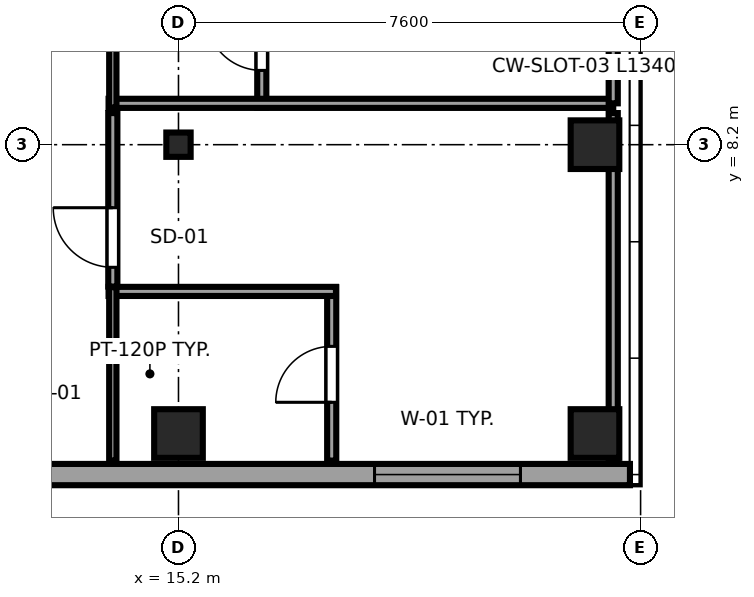
"""IFC4 building model, lengths in metres.
Left out: names, types, materials, properties, quantities, classifications, styles, units other than length and angle.
Written with IfcOpenShell. Run it as: python <this file> out.ifc"""

import sys

from ifc_helpers import new_model, si_unit, direction, frame, frame_2d, origin, origin_2d, place, context, subcontext, project, spatial, rectangle, i_section, extrude, source, transform, mapped, element, fill, save


model = new_model("IFC4")
c1 = context("Model", 3, precision=1e-05, world=origin(), true_north=direction((0.0, 1.0)))
c2 = subcontext(c1, "Body", "Model", "MODEL_VIEW")
j1 = project(units=[si_unit("LENGTHUNIT", "METRE"), si_unit("PLANEANGLEUNIT", "RADIAN")], contexts=[c1])
p1 = place(None, origin())
s1 = spatial("IfcSite", under=j1, at=p1, CompositionType="ELEMENT")
p2 = place(p1, origin())
s2 = spatial("IfcBuilding", under=s1, at=p2, CompositionType="ELEMENT")
p3 = place(p2, frame((0.0, 0.0, 187.55)))
s3 = spatial("IfcBuildingStorey", under=s2, at=p3, CompositionType="ELEMENT", Elevation=187.55)
m1 = source(origin(), c2, "Body", "SweptSolid", [
    extrude(rectangle(XDim=0.8, YDim=0.8, at=origin_2d()), origin(), (0.0, 0.0, 1.0), 3.55),
])
p4 = place(p3, frame((15.2, 3.45, 0.0), z_axis=(0.0, 0.0, 1.0), x_axis=(1.0, 0.0, 0.0)))
e1 = element("IfcColumn", 1, at=p4, inside=s3, PredefinedType="COLUMN", context=c2, shape_type="MappedRepresentation", body=[
    mapped(m1, transform((0.0, 0.0, 0.0), x_axis=(1.0, 0.0, 0.0), y_axis=(0.0, 1.0, 0.0), z_axis=(0.0, 0.0, 1.0), scale=1.0)),
])
m2 = source(origin(), c2, "Body", "SweptSolid", [
    extrude(i_section(OverallWidth=0.4, OverallDepth=0.4, WebThickness=0.02, FlangeThickness=0.035, at=origin_2d()), origin(), (0.0, 0.0, 1.0), 3.55),
])
p5 = place(p3, frame((15.2, 8.2, 0.0), z_axis=(0.0, 0.0, 1.0), x_axis=(1.0, 0.0, 0.0)))
e2 = element("IfcColumn", 2, at=p5, inside=s3, PredefinedType="COLUMN", context=c2, shape_type="MappedRepresentation", body=[
    mapped(m2, transform((0.0, 0.0, 0.0), x_axis=(1.0, 0.0, 0.0), y_axis=(0.0, 1.0, 0.0), z_axis=(0.0, 0.0, 1.0), scale=1.0)),
])
for number, where, z_axis, x_axis in (
    (3, (22.05, 3.45, 0.0), (0.0, 0.0, 1.0), (1.0, 0.0, 0.0)),
    (4, (22.05, 8.2, 0.0), (0.0, 0.0, 1.0), (1.0, 0.0, 0.0)),
):
    element("IfcColumn", number, at=place(p3, frame(where, z_axis=z_axis, x_axis=x_axis)), inside=s3, PredefinedType="COLUMN", context=c2, shape_type="MappedRepresentation", body=[
        mapped(m1, transform((0.0, 0.0, 0.0), x_axis=(1.0, 0.0, 0.0), y_axis=(0.0, 1.0, 0.0), z_axis=(0.0, 0.0, 1.0), scale=1.0)),
    ])
p6 = place(p3, frame((7.017, 2.775, 0.0), z_axis=(0.0, 0.0, 1.0), x_axis=(1.0, 0.0, 0.0)))
e5 = element("IfcWall", 5, at=p6, inside=s3, PredefinedType="SOLIDWALL", context=c2, shape_type="SweptSolid", body=[
    extrude(rectangle(XDim=15.608, YDim=0.35, at=frame_2d((7.804, 0.0))), origin(), (0.0, 0.0, 1.0), 3.37),
])
p7 = place(p6, frame((1.801, 0.0, 0.68)))
e6 = element("IfcOpeningElement", 6, at=p7, cuts=e5, PredefinedType="OPENING", context=c2, shape_type="SweptSolid", body=[
    extrude(rectangle(XDim=2.4, YDim=1.9, at=frame_2d((1.2, 0.95))), frame((0.0, 0.185, 0.0), z_axis=(0.0, -1.0, 0.0), x_axis=(1.0, 0.0, 0.0)), (0.0, 0.0, 1.0), 0.37),
])
p8 = place(p6, frame((11.407, 0.0, 0.68)))
e7 = element("IfcOpeningElement", 7, at=p8, cuts=e5, PredefinedType="OPENING", context=c2, shape_type="SweptSolid", body=[
    extrude(rectangle(XDim=2.4, YDim=1.9, at=frame_2d((1.2, 0.95))), frame((0.0, 0.185, 0.0), z_axis=(0.0, -1.0, 0.0), x_axis=(1.0, 0.0, 0.0)), (0.0, 0.0, 1.0), 0.37),
])
p9 = place(p3, frame((17.72, 3.005, 0.0), z_axis=(0.0, 0.0, 1.0), x_axis=(0.0, 1.0, 0.0)))
e8 = element("IfcWall", 8, at=p9, inside=s3, PredefinedType="PARTITIONING", context=c2, shape_type="SweptSolid", body=[
    extrude(rectangle(XDim=2.852, YDim=0.15, at=frame_2d((1.426, 0.0))), origin(), (0.0, 0.0, 1.0), 3.37),
])
p10 = place(p9, frame((0.958, 0.0, 0.0)))
e9 = element("IfcOpeningElement", 9, at=p10, cuts=e8, PredefinedType="OPENING", context=c2, shape_type="SweptSolid", body=[
    extrude(rectangle(XDim=0.92, YDim=2.01, at=frame_2d((0.46, 1.005))), frame((0.0, 0.085, 0.0), z_axis=(0.0, -1.0, 0.0), x_axis=(1.0, 0.0, 0.0)), (0.0, 0.0, 1.0), 0.17),
])
p11 = place(p3, frame((14.05, 5.787, 0.0), z_axis=(0.0, 0.0, 1.0), x_axis=(1.0, 0.0, 0.0)))
e10 = element("IfcWall", 10, at=p11, inside=s3, PredefinedType="PARTITIONING", context=c2, shape_type="SweptSolid", body=[
    extrude(rectangle(XDim=3.74, YDim=0.15, at=frame_2d((1.87, 0.0))), origin(), (0.0, 0.0, 1.0), 3.37),
])
p12 = place(p3, frame((14.12, 3.005, 0.0), z_axis=(0.0, 0.0, 1.0), x_axis=(0.0, 1.0, 0.0)))
e11 = element("IfcWall", 11, at=p12, inside=s3, PredefinedType="PLUMBINGWALL", context=c2, shape_type="SweptSolid", body=[
    extrude(rectangle(XDim=2.852, YDim=0.12, at=frame_2d((1.426, 0.0))), origin(), (0.0, 0.0, 1.0), 3.37),
])
p13 = place(p3, frame((16.57, 8.81, 0.0), z_axis=(0.0, 0.0, 1.0), x_axis=(0.0, 1.0, 0.0)))
e12 = element("IfcWall", 12, at=p13, inside=s3, PredefinedType="PARTITIONING", context=c2, shape_type="SweptSolid", body=[
    extrude(rectangle(XDim=2.283, YDim=0.15, at=frame_2d((1.142, 0.0))), origin(), (0.0, 0.0, 1.0), 3.37),
])
p14 = place(p13, frame((0.612, 0.0, 0.0)))
e13 = element("IfcOpeningElement", 13, at=p14, cuts=e12, PredefinedType="OPENING", context=c2, shape_type="SweptSolid", body=[
    extrude(rectangle(XDim=0.92, YDim=2.01, at=frame_2d((0.46, 1.005))), frame((0.0, 0.085, 0.0), z_axis=(0.0, -1.0, 0.0), x_axis=(1.0, 0.0, 0.0)), (0.0, 0.0, 1.0), 0.17),
])
p15 = place(p3, frame((14.05, 8.88, 0.0), z_axis=(0.0, 0.0, 1.0), x_axis=(1.0, 0.0, 0.0)))
e14 = element("IfcWall", 14, at=p15, inside=s3, PredefinedType="PARTITIONING", context=c2, shape_type="SweptSolid", body=[
    extrude(rectangle(XDim=8.3, YDim=0.15, at=frame_2d((4.15, 0.0))), origin(), (0.0, 0.0, 1.0), 3.37),
])
p16 = place(p3, frame((14.12, 8.81, 0.0), z_axis=(0.0, 0.0, 1.0), x_axis=(0.0, 1.0, 0.0)))
e15 = element("IfcWall", 15, at=p16, inside=s3, PredefinedType="PLUMBINGWALL", context=c2, shape_type="SweptSolid", body=[
    extrude(rectangle(XDim=2.283, YDim=0.12, at=frame_2d((1.142, 0.0))), origin(), (0.0, 0.0, 1.0), 3.37),
])
p17 = place(p3, frame((14.12, 5.867, 0.0), z_axis=(0.0, 0.0, 1.0), x_axis=(0.0, 1.0, 0.0)))
e16 = element("IfcWall", 16, at=p17, inside=s3, PredefinedType="PARTITIONING", context=c2, shape_type="SweptSolid", body=[
    extrude(rectangle(XDim=2.853, YDim=0.15, at=frame_2d((1.427, 0.0))), origin(), (0.0, 0.0, 1.0), 3.37),
])
p18 = place(p17, frame((0.316, 0.0, 0.0)))
e17 = element("IfcOpeningElement", 17, at=p18, cuts=e16, PredefinedType="OPENING", context=c2, shape_type="SweptSolid", body=[
    extrude(rectangle(XDim=0.98, YDim=2.12, at=frame_2d((0.49, 1.06))), frame((0.0, 0.085, 0.0), z_axis=(0.0, -1.0, 0.0), x_axis=(1.0, 0.0, 0.0)), (0.0, 0.0, 1.0), 0.17),
])
p19 = place(p3, frame((22.35, 3.005, 0.0), z_axis=(0.0, 0.0, 1.0), x_axis=(0.0, 1.0, 0.0)))
e18 = element("IfcWall", 18, at=p19, inside=s3, PredefinedType="PARTITIONING", context=c2, shape_type="SweptSolid", body=[
    extrude(rectangle(XDim=5.715, YDim=0.15, at=frame_2d((2.857, 0.0))), origin(), (0.0, 0.0, 1.0), 3.37),
])
p20 = place(p3, frame((22.35, 8.88, 0.0), z_axis=(0.0, 0.0, 1.0), x_axis=(0.0, 1.0, 0.0)))
e19 = element("IfcWall", 19, at=p20, inside=s3, PredefinedType="PARTITIONING", context=c2, shape_type="SweptSolid", body=[
    extrude(rectangle(XDim=5.64, YDim=0.15, at=frame_2d((2.82, 0.0))), origin(), (0.0, 0.0, 1.0), 3.37),
])
m3 = source(origin(), c2, "Body", "SweptSolid", [
    extrude(rectangle(XDim=2.4, YDim=1.9, at=frame_2d((1.2, 0.95))), frame((0.0, 0.09, 0.0), z_axis=(0.0, -1.0, 0.0), x_axis=(1.0, 0.0, 0.0)), (0.0, 0.0, 1.0), 0.06),
])
p21 = place(p8, origin())
e20 = element("IfcWindow", 20, at=p21, inside=s3, PartitioningType="TRIPLE_PANEL_HORIZONTAL", PredefinedType="WINDOW", context=c2, shape_type="MappedRepresentation", body=[
    mapped(m3, transform((0.0, 0.0, 0.0), x_axis=(1.0, 0.0, 0.0), y_axis=(0.0, 1.0, 0.0), z_axis=(0.0, 0.0, 1.0), scale=1.0)),
])
fill(e7, e20)
m4 = source(origin(), c2, "Body", "SweptSolid", [
    extrude(rectangle(XDim=0.92, YDim=2.01, at=frame_2d((0.46, 1.005))), frame((0.0, 0.025, 0.0), z_axis=(0.0, -1.0, 0.0), x_axis=(1.0, 0.0, 0.0)), (0.0, 0.0, 1.0), 0.05),
])
p22 = place(p10, origin())
e21 = element("IfcDoor", 21, at=p22, inside=s3, OperationType="SINGLE_SWING_LEFT", PredefinedType="DOOR", context=c2, shape_type="MappedRepresentation", body=[
    mapped(m4, transform((0.0, 0.0, 0.0), x_axis=(1.0, 0.0, 0.0), y_axis=(0.0, 1.0, 0.0), z_axis=(0.0, 0.0, 1.0), scale=1.0)),
])
fill(e9, e21)
p23 = place(p14, origin())
e22 = element("IfcDoor", 22, at=p23, inside=s3, OperationType="SINGLE_SWING_RIGHT", PredefinedType="DOOR", context=c2, shape_type="MappedRepresentation", body=[
    mapped(m4, transform((0.0, 0.0, 0.0), x_axis=(1.0, 0.0, 0.0), y_axis=(0.0, 1.0, 0.0), z_axis=(0.0, 0.0, 1.0), scale=1.0)),
])
fill(e13, e22)
m5 = source(origin(), c2, "Body", "SweptSolid", [
    extrude(rectangle(XDim=0.98, YDim=2.12, at=frame_2d((0.49, 1.06))), frame((0.0, 0.025, 0.0), z_axis=(0.0, -1.0, 0.0), x_axis=(1.0, 0.0, 0.0)), (0.0, 0.0, 1.0), 0.05),
])
p24 = place(p18, origin())
e23 = element("IfcDoor", 23, at=p24, inside=s3, OperationType="SINGLE_SWING_RIGHT", PredefinedType="DOOR", context=c2, shape_type="MappedRepresentation", body=[
    mapped(m5, transform((0.0, 0.0, 0.0), x_axis=(1.0, 0.0, 0.0), y_axis=(0.0, 1.0, 0.0), z_axis=(0.0, 0.0, 1.0), scale=1.0)),
])
fill(e17, e23)
save(model, sys.argv[1])
